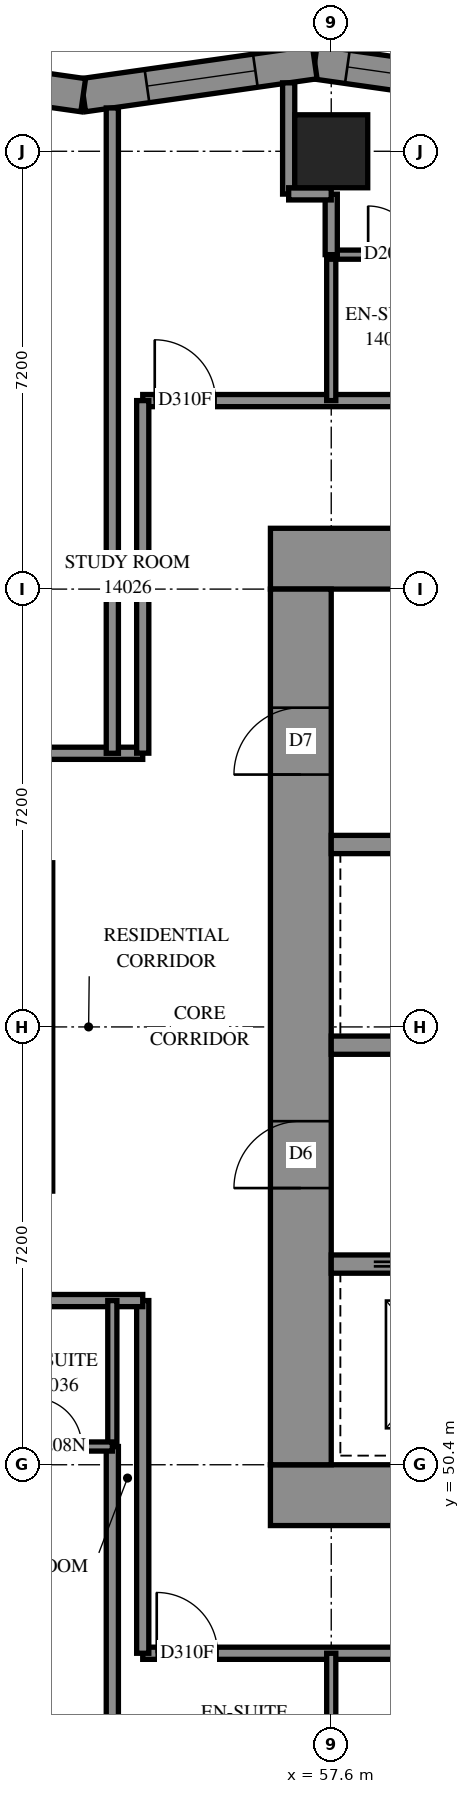
"""IFC4 building model, lengths in metres.
Left out: names, types, materials, properties, quantities, classifications, styles, units other than length and angle.
Written with IfcOpenShell. Run it as: python <this file> out.ifc"""

import sys

from ifc_helpers import new_model, si_unit, direction, frame, frame_2d, origin, origin_2d, place, context, subcontext, project, spatial, polyline, rectangle, outline, extrude, element, fill, save


model = new_model("IFC4")
c1 = context("Model", 3, precision=1e-05, world=origin(), true_north=direction((0.0, 1.0)))
c2 = subcontext(c1, "Body", "Model", "MODEL_VIEW")
j1 = project(units=[si_unit("LENGTHUNIT", "METRE"), si_unit("PLANEANGLEUNIT", "RADIAN")], contexts=[c1])
p1 = place(None, origin())
s1 = spatial("IfcSite", under=j1, at=p1, CompositionType="ELEMENT")
p2 = place(p1, origin())
s2 = spatial("IfcBuilding", under=s1, at=p2, CompositionType="ELEMENT")
p3 = place(p2, frame((0.0, 0.0, 54.2)))
s3 = spatial("IfcBuildingStorey", under=s2, at=p3, CompositionType="ELEMENT", Elevation=54.2)
p4 = place(p3, frame((57.6, 72.0, 0.0), z_axis=(0.0, 0.0, 1.0), x_axis=(1.0, 0.0, 0.0)))
e1 = element("IfcColumn", 1, at=p4, inside=s3, PredefinedType="COLUMN", context=c2, shape_type="SweptSolid", body=[
    extrude(rectangle(XDim=1.2, YDim=1.2, at=origin_2d()), origin(), (0.0, 0.0, 1.0), 3.1),
])
p5 = place(p3, frame((56.6, 49.9, -0.3), z_axis=(0.0, 0.0, 1.0), x_axis=(1.0, 0.0, 0.0)))
e2 = element("IfcWall", 2, at=p5, inside=s3, PredefinedType="SHEAR", context=c2, shape_type="SweptSolid", body=[
    extrude(rectangle(XDim=16.4, YDim=1.0, at=frame_2d((8.2, 0.0))), origin(), (0.0, 0.0, 1.0), 2.7),
])
p6 = place(p3, frame((56.6, 65.3, -0.3), z_axis=(0.0, 0.0, 1.0), x_axis=(1.0, 0.0, 0.0)))
e3 = element("IfcWall", 3, at=p6, inside=s3, PredefinedType="SHEAR", context=c2, shape_type="SweptSolid", body=[
    extrude(rectangle(XDim=16.4, YDim=1.0, at=frame_2d((8.2, 0.0))), origin(), (0.0, 0.0, 1.0), 2.7),
])
p7 = place(p6, frame((11.0, 0.0, 0.3)))
e4 = element("IfcOpeningElement", 4, at=p7, cuts=e3, PredefinedType="OPENING", context=c2, shape_type="SweptSolid", body=[
    extrude(rectangle(XDim=0.8, YDim=2.1, at=frame_2d((0.4, 1.05))), frame((0.0, 0.51, 0.0), z_axis=(0.0, -1.0, 0.0), x_axis=(1.0, 0.0, 0.0)), (0.0, 0.0, 1.0), 1.02),
])
p8 = place(p3, frame((57.1, 50.4, -0.3), z_axis=(0.0, 0.0, 1.0), x_axis=(0.0, 1.0, 0.0)))
e5 = element("IfcWall", 5, at=p8, inside=s3, PredefinedType="SHEAR", context=c2, shape_type="SweptSolid", body=[
    extrude(rectangle(XDim=14.4, YDim=1.0, at=frame_2d((7.2, 0.0))), origin(), (0.0, 0.0, 1.0), 2.7),
])
p9 = place(p8, frame((4.55, 0.0, 0.3)))
e6 = element("IfcOpeningElement", 6, at=p9, cuts=e5, PredefinedType="OPENING", context=c2, shape_type="SweptSolid", body=[
    extrude(rectangle(XDim=1.1, YDim=2.1, at=frame_2d((0.55, 1.05))), frame((0.0, 0.51, 0.0), z_axis=(0.0, -1.0, 0.0), x_axis=(1.0, 0.0, 0.0)), (0.0, 0.0, 1.0), 1.02),
])
p10 = place(p8, frame((11.35, 0.0, 0.3)))
e7 = element("IfcOpeningElement", 7, at=p10, cuts=e5, PredefinedType="OPENING", context=c2, shape_type="SweptSolid", body=[
    extrude(rectangle(XDim=1.1, YDim=2.1, at=frame_2d((0.55, 1.05))), frame((0.0, 0.51, 0.0), z_axis=(0.0, -1.0, 0.0), x_axis=(1.0, 0.0, 0.0)), (0.0, 0.0, 1.0), 1.02),
])
p11 = place(p3, frame((57.6, 53.7, 0.0), z_axis=(0.0, 0.0, 1.0), x_axis=(1.0, 0.0, 0.0)))
e8 = element("IfcWall", 8, at=p11, inside=s3, PredefinedType="SOLIDWALL", context=c2, shape_type="SweptSolid", body=[
    extrude(rectangle(XDim=14.4, YDim=0.3, at=frame_2d((7.2, 0.0))), origin(), (0.0, 0.0, 1.0), 3.1),
])
p12 = place(p11, frame((1.25, 0.0, 0.0)))
e9 = element("IfcOpeningElement", 9, at=p12, cuts=e8, PredefinedType="OPENING", context=c2, shape_type="SweptSolid", body=[
    extrude(rectangle(XDim=1.1, YDim=2.1, at=frame_2d((0.55, 1.05))), frame((0.0, 0.16, 0.0), z_axis=(0.0, -1.0, 0.0), x_axis=(1.0, 0.0, 0.0)), (0.0, 0.0, 1.0), 0.32),
])
p13 = place(p11, frame((4.85, 0.0, 0.0)))
e10 = element("IfcOpeningElement", 10, at=p13, cuts=e8, PredefinedType="OPENING", context=c2, shape_type="SweptSolid", body=[
    extrude(rectangle(XDim=1.1, YDim=2.1, at=frame_2d((0.55, 1.05))), frame((0.0, 0.16, 0.0), z_axis=(0.0, -1.0, 0.0), x_axis=(1.0, 0.0, 0.0)), (0.0, 0.0, 1.0), 0.32),
])
p14 = place(p11, frame((8.45, 0.0, 0.0)))
e11 = element("IfcOpeningElement", 11, at=p14, cuts=e8, PredefinedType="OPENING", context=c2, shape_type="SweptSolid", body=[
    extrude(rectangle(XDim=1.1, YDim=2.1, at=frame_2d((0.55, 1.05))), frame((0.0, 0.16, 0.0), z_axis=(0.0, -1.0, 0.0), x_axis=(1.0, 0.0, 0.0)), (0.0, 0.0, 1.0), 0.32),
])
p15 = place(p11, frame((12.05, 0.0, 0.0)))
e12 = element("IfcOpeningElement", 12, at=p15, cuts=e8, PredefinedType="OPENING", context=c2, shape_type="SweptSolid", body=[
    extrude(rectangle(XDim=1.1, YDim=2.1, at=frame_2d((0.55, 1.05))), frame((0.0, 0.16, 0.0), z_axis=(0.0, -1.0, 0.0), x_axis=(1.0, 0.0, 0.0)), (0.0, 0.0, 1.0), 0.32),
])
p16 = place(p3, frame((57.6, 57.3, 0.0), z_axis=(0.0, 0.0, 1.0), x_axis=(1.0, 0.0, 0.0)))
e13 = element("IfcWall", 13, at=p16, inside=s3, PredefinedType="SOLIDWALL", context=c2, shape_type="SweptSolid", body=[
    extrude(rectangle(XDim=14.4, YDim=0.3, at=frame_2d((7.2, 0.0))), origin(), (0.0, 0.0, 1.0), 3.1),
])
p17 = place(p16, frame((12.05, 0.0, 0.0)))
e14 = element("IfcOpeningElement", 14, at=p17, cuts=e13, PredefinedType="OPENING", context=c2, shape_type="SweptSolid", body=[
    extrude(rectangle(XDim=1.1, YDim=2.1, at=frame_2d((0.55, 1.05))), frame((0.0, 0.16, 0.0), z_axis=(0.0, -1.0, 0.0), x_axis=(1.0, 0.0, 0.0)), (0.0, 0.0, 1.0), 0.32),
])
p18 = place(p3, frame((57.6, 60.6, 0.0), z_axis=(0.0, 0.0, 1.0), x_axis=(1.0, 0.0, 0.0)))
e15 = element("IfcWall", 15, at=p18, inside=s3, PredefinedType="SOLIDWALL", context=c2, shape_type="SweptSolid", body=[
    extrude(rectangle(XDim=7.2, YDim=0.3, at=frame_2d((3.6, 0.0))), origin(), (0.0, 0.0, 1.0), 3.1),
])
p19 = place(p3, frame((61.135, 72.922, 0.0), z_axis=(0.0, 0.0, 1.0), x_axis=(-0.990016994, 0.1409480459, 0.0)))
e16 = element("IfcWall", 16, at=p19, inside=s3, PredefinedType="SOLIDWALL", context=c2, shape_type="SweptSolid", body=[
    extrude(outline(polyline([(0.039, -0.275), (3.885, -0.275), (3.806, 0.275), (-0.039, 0.275), (0.039, -0.275)])), origin(), (0.0, 0.0, 1.0), 3.1),
])
p20 = place(p19, frame((0.503, 0.0, 0.5)))
e17 = element("IfcOpeningElement", 17, at=p20, cuts=e16, PredefinedType="OPENING", context=c2, shape_type="SweptSolid", body=[
    extrude(rectangle(XDim=2.8, YDim=2.45, at=frame_2d((1.4, 1.225))), frame((0.0, 0.285, 0.0), z_axis=(0.0, -1.0, 0.0), x_axis=(1.0, 0.0, 0.0)), (0.0, 0.0, 1.0), 0.57),
])
p21 = place(p3, frame((57.328, 73.464, 0.0), z_axis=(0.0, 0.0, 1.0), x_axis=(-0.990016994, -0.1409480459, 0.0)))
e18 = element("IfcWall", 18, at=p21, inside=s3, PredefinedType="SOLIDWALL", context=c2, shape_type="SweptSolid", body=[
    extrude(outline(polyline([(-0.039, -0.275), (3.806, -0.275), (3.885, 0.275), (0.039, 0.275), (-0.039, -0.275)])), origin(), (0.0, 0.0, 1.0), 3.1),
])
p22 = place(p21, frame((0.986, 0.0, 0.7)))
e19 = element("IfcOpeningElement", 19, at=p22, cuts=e18, PredefinedType="OPENING", context=c2, shape_type="SweptSolid", body=[
    extrude(rectangle(XDim=1.8, YDim=2.2, at=frame_2d((0.9, 1.1))), frame((0.0, 0.285, 0.0), z_axis=(0.0, -1.0, 0.0), x_axis=(1.0, 0.0, 0.0)), (0.0, 0.0, 1.0), 0.57),
])
p23 = place(p3, frame((53.521, 72.922, 0.0), z_axis=(0.0, 0.0, 1.0), x_axis=(-0.990016994, 0.1409480459, 0.0)))
e20 = element("IfcWall", 20, at=p23, inside=s3, PredefinedType="SOLIDWALL", context=c2, shape_type="SweptSolid", body=[
    extrude(outline(polyline([(0.039, -0.275), (3.885, -0.275), (3.806, 0.275), (-0.039, 0.275), (0.039, -0.275)])), origin(), (0.0, 0.0, 1.0), 3.1),
])
p24 = place(p23, frame((1.076, 0.0, 0.5)))
e21 = element("IfcOpeningElement", 21, at=p24, cuts=e20, PredefinedType="OPENING", context=c2, shape_type="SweptSolid", body=[
    extrude(rectangle(XDim=1.2, YDim=2.45, at=frame_2d((0.6, 1.225))), frame((0.0, 0.285, 0.0), z_axis=(0.0, -1.0, 0.0), x_axis=(1.0, 0.0, 0.0)), (0.0, 0.0, 1.0), 0.57),
])
p25 = place(p3, frame((33.3, 62.1, 0.0), z_axis=(0.0, 0.0, 1.0), x_axis=(1.0, 0.0, 0.0)))
e22 = element("IfcWall", 22, at=p25, inside=s3, PredefinedType="PARTITIONING", context=c2, shape_type="SweptSolid", body=[
    extrude(rectangle(XDim=21.2, YDim=0.2, at=frame_2d((10.6, 0.0))), origin(), (0.0, 0.0, 1.0), 3.1),
])
p26 = place(p25, frame((1.395, 0.0, 0.0)))
e23 = element("IfcOpeningElement", 23, at=p26, cuts=e22, PredefinedType="OPENING", context=c2, shape_type="SweptSolid", body=[
    extrude(rectangle(XDim=0.9, YDim=2.1, at=frame_2d((0.45, 1.05))), frame((0.0, 0.11, 0.0), z_axis=(0.0, -1.0, 0.0), x_axis=(1.0, 0.0, 0.0)), (0.0, 0.0, 1.0), 0.22),
])
p27 = place(p25, frame((8.674, 0.0, 0.0)))
e24 = element("IfcOpeningElement", 24, at=p27, cuts=e22, PredefinedType="OPENING", context=c2, shape_type="SweptSolid", body=[
    extrude(rectangle(XDim=1.0, YDim=2.1, at=frame_2d((0.5, 1.05))), frame((0.0, 0.11, 0.0), z_axis=(0.0, -1.0, 0.0), x_axis=(1.0, 0.0, 0.0)), (0.0, 0.0, 1.0), 0.22),
])
p28 = place(p25, frame((15.874, 0.0, 0.0)))
e25 = element("IfcOpeningElement", 25, at=p28, cuts=e22, PredefinedType="OPENING", context=c2, shape_type="SweptSolid", body=[
    extrude(rectangle(XDim=1.0, YDim=2.1, at=frame_2d((0.5, 1.05))), frame((0.0, 0.11, 0.0), z_axis=(0.0, -1.0, 0.0), x_axis=(1.0, 0.0, 0.0)), (0.0, 0.0, 1.0), 0.22),
])
p29 = place(p3, frame((54.5, 67.9, 0.0), z_axis=(0.0, 0.0, 1.0), x_axis=(1.0, 0.0, 0.0)))
e26 = element("IfcWall", 26, at=p29, inside=s3, PredefinedType="PARTITIONING", context=c2, shape_type="SweptSolid", body=[
    extrude(rectangle(XDim=20.6, YDim=0.2, at=frame_2d((10.3, 0.0))), origin(), (0.0, 0.0, 1.0), 3.1),
])
p30 = place(p29, frame((0.198, 0.0, 0.0)))
e27 = element("IfcOpeningElement", 27, at=p30, cuts=e26, PredefinedType="OPENING", context=c2, shape_type="SweptSolid", body=[
    extrude(rectangle(XDim=1.0, YDim=2.1, at=frame_2d((0.5, 1.05))), frame((0.0, 0.11, 0.0), z_axis=(0.0, -1.0, 0.0), x_axis=(1.0, 0.0, 0.0)), (0.0, 0.0, 1.0), 0.22),
])
p31 = place(p29, frame((19.358, 0.0, 0.0)))
e28 = element("IfcOpeningElement", 28, at=p31, cuts=e26, PredefinedType="OPENING", context=c2, shape_type="SweptSolid", body=[
    extrude(rectangle(XDim=1.0, YDim=2.1, at=frame_2d((0.5, 1.05))), frame((0.0, 0.11, 0.0), z_axis=(0.0, -1.0, 0.0), x_axis=(1.0, 0.0, 0.0)), (0.0, 0.0, 1.0), 0.22),
])
p32 = place(p29, frame((6.698, 0.0, 0.0)))
e29 = element("IfcOpeningElement", 29, at=p32, cuts=e26, PredefinedType="OPENING", context=c2, shape_type="SweptSolid", body=[
    extrude(rectangle(XDim=0.9, YDim=2.1, at=frame_2d((0.45, 1.05))), frame((0.0, 0.11, 0.0), z_axis=(0.0, -1.0, 0.0), x_axis=(1.0, 0.0, 0.0)), (0.0, 0.0, 1.0), 0.22),
])
p33 = place(p29, frame((13.884, 0.0, 0.0)))
e30 = element("IfcOpeningElement", 30, at=p33, cuts=e26, PredefinedType="OPENING", context=c2, shape_type="SweptSolid", body=[
    extrude(rectangle(XDim=1.0, YDim=2.1, at=frame_2d((0.5, 1.05))), frame((0.0, 0.11, 0.0), z_axis=(0.0, -1.0, 0.0), x_axis=(1.0, 0.0, 0.0)), (0.0, 0.0, 1.0), 0.22),
])
p34 = place(p3, frame((54.5, 47.3, 0.0), z_axis=(0.0, 0.0, 1.0), x_axis=(1.0, 0.0, 0.0)))
e31 = element("IfcWall", 31, at=p34, inside=s3, PredefinedType="PARTITIONING", context=c2, shape_type="SweptSolid", body=[
    extrude(rectangle(XDim=19.56, YDim=0.2, at=frame_2d((9.78, 0.0))), origin(), (0.0, 0.0, 1.0), 3.1),
])
p35 = place(p34, frame((0.23, 0.0, 0.0)))
e32 = element("IfcOpeningElement", 32, at=p35, cuts=e31, PredefinedType="OPENING", context=c2, shape_type="SweptSolid", body=[
    extrude(rectangle(XDim=1.0, YDim=2.1, at=frame_2d((0.5, 1.05))), frame((0.0, 0.11, 0.0), z_axis=(0.0, -1.0, 0.0), x_axis=(1.0, 0.0, 0.0)), (0.0, 0.0, 1.0), 0.22),
])
p36 = place(p34, frame((5.4, 0.0, 0.0)))
e33 = element("IfcOpeningElement", 33, at=p36, cuts=e31, PredefinedType="OPENING", context=c2, shape_type="SweptSolid", body=[
    extrude(rectangle(XDim=0.9, YDim=2.1, at=frame_2d((0.45, 1.05))), frame((0.0, 0.11, 0.0), z_axis=(0.0, -1.0, 0.0), x_axis=(1.0, 0.0, 0.0)), (0.0, 0.0, 1.0), 0.22),
])
p37 = place(p34, frame((9.001, 0.0, 0.0)))
e34 = element("IfcOpeningElement", 34, at=p37, cuts=e31, PredefinedType="OPENING", context=c2, shape_type="SweptSolid", body=[
    extrude(rectangle(XDim=0.9, YDim=2.1, at=frame_2d((0.45, 1.05))), frame((0.0, 0.11, 0.0), z_axis=(0.0, -1.0, 0.0), x_axis=(1.0, 0.0, 0.0)), (0.0, 0.0, 1.0), 0.22),
])
p38 = place(p34, frame((14.3, 0.0, 0.0)))
e35 = element("IfcOpeningElement", 35, at=p38, cuts=e31, PredefinedType="OPENING", context=c2, shape_type="SweptSolid", body=[
    extrude(rectangle(XDim=0.9, YDim=2.1, at=frame_2d((0.45, 1.05))), frame((0.0, 0.11, 0.0), z_axis=(0.0, -1.0, 0.0), x_axis=(1.0, 0.0, 0.0)), (0.0, 0.0, 1.0), 0.22),
])
p39 = place(p3, frame((54.0, 62.1, 0.0), z_axis=(0.0, 0.0, 1.0), x_axis=(0.0, 1.0, 0.0)))
e36 = element("IfcWall", 36, at=p39, inside=s3, PredefinedType="PARTITIONING", context=c2, shape_type="SweptSolid", body=[
    extrude(rectangle(XDim=10.613, YDim=0.2, at=frame_2d((5.306, 0.0))), origin(), (0.0, 0.0, 1.0), 3.1),
])
p40 = place(p3, frame((54.0, 42.336, 0.0), z_axis=(0.0, 0.0, 1.0), x_axis=(0.0, 1.0, 0.0)))
e37 = element("IfcWall", 37, at=p40, inside=s3, PredefinedType="PARTITIONING", context=c2, shape_type="SweptSolid", body=[
    extrude(rectangle(XDim=8.364, YDim=0.2, at=frame_2d((4.182, 0.0))), origin(), (0.0, 0.0, 1.0), 3.1),
])
p41 = place(p3, frame((54.5, 47.3, 0.0), z_axis=(0.0, 0.0, 1.0), x_axis=(0.0, 1.0, 0.0)))
e38 = element("IfcWall", 38, at=p41, inside=s3, PredefinedType="PARTITIONING", context=c2, shape_type="SweptSolid", body=[
    extrude(rectangle(XDim=5.8, YDim=0.2, at=frame_2d((2.9, 0.0))), origin(), (0.0, 0.0, 1.0), 3.1),
])
p42 = place(p3, frame((54.5, 62.102, 0.0), z_axis=(0.0, 0.0, 1.0), x_axis=(0.0, 1.0, 0.0)))
e39 = element("IfcWall", 39, at=p42, inside=s3, PredefinedType="PARTITIONING", context=c2, shape_type="SweptSolid", body=[
    extrude(rectangle(XDim=5.798, YDim=0.2, at=frame_2d((2.899, 0.0))), origin(), (0.0, 0.0, 1.0), 3.1),
])
p43 = place(p3, frame((50.4, 53.1, 0.0), z_axis=(0.0, 0.0, 1.0), x_axis=(1.0, 0.0, 0.0)))
e40 = element("IfcWall", 40, at=p43, inside=s3, PredefinedType="PARTITIONING", context=c2, shape_type="SweptSolid", body=[
    extrude(rectangle(XDim=4.1, YDim=0.2, at=frame_2d((2.05, 0.0))), origin(), (0.0, 0.0, 1.0), 3.1),
])
p44 = place(p43, frame((0.4, 0.0, 0.0)))
e41 = element("IfcOpeningElement", 41, at=p44, cuts=e40, PredefinedType="OPENING", context=c2, shape_type="SweptSolid", body=[
    extrude(rectangle(XDim=0.9, YDim=2.1, at=frame_2d((0.45, 1.05))), frame((0.0, 0.11, 0.0), z_axis=(0.0, -1.0, 0.0), x_axis=(1.0, 0.0, 0.0)), (0.0, 0.0, 1.0), 0.22),
])
for number, where, z_axis, x_axis in (
    (42, (54.0, 50.7, 0.0), (0.0, 0.0, 1.0), (0.0, 1.0, 0.0)),
    (43, (57.6, 44.9, 0.0), (0.0, 0.0, 1.0), (0.0, 1.0, 0.0)),
    (44, (57.6, 67.9, 0.0), (0.0, 0.0, 1.0), (0.0, 1.0, 0.0)),
):
    element("IfcWall", number, at=place(p3, frame(where, z_axis=z_axis, x_axis=x_axis)), inside=s3, PredefinedType="PARTITIONING", context=c2, shape_type="SweptSolid", body=[
        extrude(rectangle(XDim=2.4, YDim=0.15, at=frame_2d((1.2, 0.0))), origin(), (0.0, 0.0, 1.0), 3.1),
    ])
p45 = place(p3, frame((52.1, 50.7, 0.0), z_axis=(0.0, 0.0, 1.0), x_axis=(1.0, 0.0, 0.0)))
e45 = element("IfcWall", 45, at=p45, inside=s3, PredefinedType="PARTITIONING", context=c2, shape_type="SweptSolid", body=[
    extrude(rectangle(XDim=1.9, YDim=0.15, at=frame_2d((0.95, 0.0))), origin(), (0.0, 0.0, 1.0), 3.1),
])
p46 = place(p45, frame((0.598, 0.0, 0.0)))
e46 = element("IfcOpeningElement", 46, at=p46, cuts=e45, PredefinedType="OPENING", context=c2, shape_type="SweptSolid", body=[
    extrude(rectangle(XDim=0.8, YDim=2.1, at=frame_2d((0.4, 1.05))), frame((0.0, 0.085, 0.0), z_axis=(0.0, -1.0, 0.0), x_axis=(1.0, 0.0, 0.0)), (0.0, 0.0, 1.0), 0.17),
])
p47 = place(p3, frame((57.6, 70.3, 0.0), z_axis=(0.0, 0.0, 1.0), x_axis=(1.0, 0.0, 0.0)))
e47 = element("IfcWall", 47, at=p47, inside=s3, PredefinedType="PARTITIONING", context=c2, shape_type="SweptSolid", body=[
    extrude(rectangle(XDim=1.9, YDim=0.15, at=frame_2d((0.95, 0.0))), origin(), (0.0, 0.0, 1.0), 3.1),
])
p48 = place(p47, frame((0.607, 0.0, 0.0)))
e48 = element("IfcOpeningElement", 48, at=p48, cuts=e47, PredefinedType="OPENING", context=c2, shape_type="SweptSolid", body=[
    extrude(rectangle(XDim=0.8, YDim=2.1, at=frame_2d((0.4, 1.05))), frame((0.0, 0.085, 0.0), z_axis=(0.0, -1.0, 0.0), x_axis=(1.0, 0.0, 0.0)), (0.0, 0.0, 1.0), 0.17),
])
p49 = place(p3, frame((56.9, 71.296, 0.0), z_axis=(0.0, 0.0, 1.0), x_axis=(0.0, 1.0, 0.0)))
e49 = element("IfcWall", 49, at=p49, inside=s3, PredefinedType="PARTITIONING", context=c2, shape_type="SweptSolid", body=[
    extrude(rectangle(XDim=1.829, YDim=0.2, at=frame_2d((0.915, 0.0))), origin(), (0.0, 0.0, 1.0), 3.1),
])
p50 = place(p3, frame((57.6, 70.3, 0.0), z_axis=(0.0, 0.0, 1.0), x_axis=(0.0, 1.0, 0.0)))
e50 = element("IfcWall", 50, at=p50, inside=s3, PredefinedType="PARTITIONING", context=c2, shape_type="SweptSolid", body=[
    extrude(rectangle(XDim=0.996, YDim=0.2, at=frame_2d((0.498, 0.0))), origin(), (0.0, 0.0, 1.0), 3.1),
])
p51 = place(p3, frame((56.9, 71.3, 0.0), z_axis=(0.0, 0.0, 1.0), x_axis=(1.0, 0.0, 0.0)))
e51 = element("IfcWall", 51, at=p51, inside=s3, PredefinedType="PARTITIONING", context=c2, shape_type="SweptSolid", body=[
    extrude(rectangle(XDim=0.7, YDim=0.2, at=frame_2d((0.35, 0.0))), origin(), (0.0, 0.0, 1.0), 3.1),
])
p52 = place(p20, origin())
e52 = element("IfcWindow", 52, at=p52, inside=s3, PartitioningType="SINGLE_PANEL", PredefinedType="WINDOW", context=c2, shape_type="SweptSolid", body=[
    extrude(rectangle(XDim=2.8, YDim=2.45, at=frame_2d((1.4, 1.225))), frame((0.0, 0.155, 0.0), z_axis=(0.0, -1.0, 0.0), x_axis=(1.0, 0.0, 0.0)), (0.0, 0.0, 1.0), 0.06),
])
fill(e17, e52)
p53 = place(p9, origin())
e53 = element("IfcDoor", 53, at=p53, inside=s3, OperationType="DOUBLE_DOOR_SINGLE_SWING", PredefinedType="DOOR", context=c2, shape_type="SweptSolid", body=[
    extrude(rectangle(XDim=1.1, YDim=2.1, at=frame_2d((0.55, 1.05))), frame((0.0, 0.025, 0.0), z_axis=(0.0, -1.0, 0.0), x_axis=(1.0, 0.0, 0.0)), (0.0, 0.0, 1.0), 0.05),
])
fill(e6, e53)
p54 = place(p10, origin())
e54 = element("IfcDoor", 54, at=p54, inside=s3, OperationType="SINGLE_SWING_LEFT", PredefinedType="DOOR", context=c2, shape_type="SweptSolid", body=[
    extrude(rectangle(XDim=1.1, YDim=2.1, at=frame_2d((0.55, 1.05))), frame((0.0, 0.025, 0.0), z_axis=(0.0, -1.0, 0.0), x_axis=(1.0, 0.0, 0.0)), (0.0, 0.0, 1.0), 0.05),
])
fill(e7, e54)
p55 = place(p30, origin())
e55 = element("IfcDoor", 55, at=p55, inside=s3, OperationType="SINGLE_SWING_LEFT", PredefinedType="DOOR", context=c2, shape_type="SweptSolid", body=[
    extrude(rectangle(XDim=1.0, YDim=2.1, at=frame_2d((0.5, 1.05))), frame((0.0, 0.025, 0.0), z_axis=(0.0, -1.0, 0.0), x_axis=(1.0, 0.0, 0.0)), (0.0, 0.0, 1.0), 0.05),
])
fill(e27, e55)
p56 = place(p46, origin())
e56 = element("IfcDoor", 56, at=p56, inside=s3, OperationType="SINGLE_SWING_RIGHT", PredefinedType="DOOR", context=c2, shape_type="SweptSolid", body=[
    extrude(rectangle(XDim=0.8, YDim=2.1, at=frame_2d((0.4, 1.05))), frame((0.0, 0.025, 0.0), z_axis=(0.0, -1.0, 0.0), x_axis=(1.0, 0.0, 0.0)), (0.0, 0.0, 1.0), 0.05),
])
fill(e46, e56)
p57 = place(p35, origin())
e57 = element("IfcDoor", 57, at=p57, inside=s3, OperationType="SINGLE_SWING_RIGHT", PredefinedType="DOOR", context=c2, shape_type="SweptSolid", body=[
    extrude(rectangle(XDim=1.0, YDim=2.1, at=frame_2d((0.5, 1.05))), frame((0.0, 0.025, 0.0), z_axis=(0.0, -1.0, 0.0), x_axis=(1.0, 0.0, 0.0)), (0.0, 0.0, 1.0), 0.05),
])
fill(e32, e57)
p58 = place(p48, origin())
e58 = element("IfcDoor", 58, at=p58, inside=s3, OperationType="SINGLE_SWING_RIGHT", PredefinedType="DOOR", context=c2, shape_type="SweptSolid", body=[
    extrude(rectangle(XDim=0.8, YDim=2.1, at=frame_2d((0.4, 1.05))), frame((0.0, 0.025, 0.0), z_axis=(0.0, -1.0, 0.0), x_axis=(1.0, 0.0, 0.0)), (0.0, 0.0, 1.0), 0.05),
])
fill(e48, e58)
p59 = place(p22, origin())
e59 = element("IfcWindow", 59, at=p59, inside=s3, PartitioningType="SINGLE_PANEL", PredefinedType="WINDOW", context=c2, shape_type="SweptSolid", body=[
    extrude(rectangle(XDim=1.8, YDim=2.2, at=frame_2d((0.9, 1.1))), frame((0.0, 0.155, 0.0), z_axis=(0.0, -1.0, 0.0), x_axis=(1.0, 0.0, 0.0)), (0.0, 0.0, 1.0), 0.06),
])
fill(e19, e59)
save(model, sys.argv[1])
